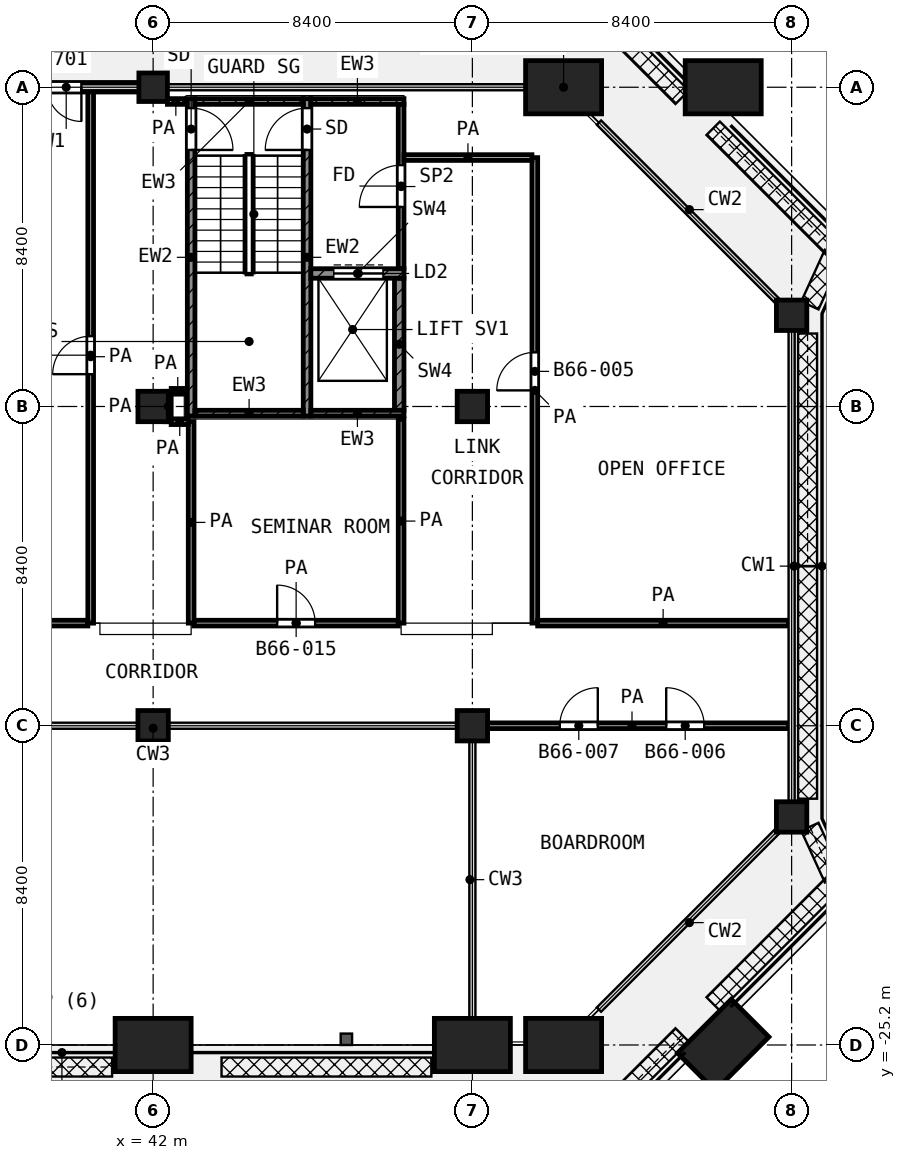
"""IFC4 building model, lengths in metres.
Left out: names, types, materials, properties, quantities, classifications, styles, units other than length and angle.
Written with IfcOpenShell. Run it as: python <this file> out.ifc"""

import sys

from ifc_helpers import new_model, si_unit, direction, frame, frame_2d, origin, origin_2d, place, context, subcontext, project, spatial, rectangle, extrude, element, fill, save


model = new_model("IFC4")
c1 = context("Model", 3, precision=1e-05, world=origin(), true_north=direction((0.0, 1.0)))
c2 = subcontext(c1, "Body", "Model", "MODEL_VIEW")
j1 = project(units=[si_unit("LENGTHUNIT", "METRE"), si_unit("PLANEANGLEUNIT", "RADIAN")], contexts=[c1])
p1 = place(None, origin())
s1 = spatial("IfcSite", under=j1, at=p1, CompositionType="ELEMENT")
p2 = place(p1, origin())
s2 = spatial("IfcBuilding", under=s1, at=p2, CompositionType="ELEMENT")
p3 = place(p2, frame((0.0, 0.0, 286.0)))
s3 = spatial("IfcBuildingStorey", under=s2, at=p3, CompositionType="ELEMENT", Elevation=286.0)
p4 = place(p3, frame((42.0, 0.0, 0.0), z_axis=(0.0, 0.0, 1.0), x_axis=(1.0, 0.0, 0.0)))
e1 = element("IfcColumn", 1, at=p4, inside=s3, PredefinedType="COLUMN", context=c2, shape_type="SweptSolid", body=[
    extrude(rectangle(XDim=0.75, YDim=0.75, at=origin_2d()), origin(), (0.0, 0.0, 1.0), 4.2),
])
p5 = place(p3, frame((52.8, 0.0, 0.0), z_axis=(0.0, 0.0, 1.0), x_axis=(1.0, 0.0, 0.0)))
e2 = element("IfcColumn", 2, at=p5, inside=s3, PredefinedType="COLUMN", context=c2, shape_type="SweptSolid", body=[
    extrude(rectangle(XDim=2.0, YDim=1.4, at=origin_2d()), origin(), (0.0, 0.0, 1.0), 4.2),
])
for number, where, z_axis, x_axis in (
    (3, (58.8, -6.0, 0.0), (0.0, 0.0, 1.0), (1.0, 0.0, 0.0)),
    (4, (42.0, -8.4, 0.0), (0.0, 0.0, 1.0), (1.0, 0.0, 0.0)),
    (5, (50.4, -8.4, 0.0), (0.0, 0.0, 1.0), (1.0, 0.0, 0.0)),
    (6, (42.0, -16.8, 0.0), (0.0, 0.0, 1.0), (1.0, 0.0, 0.0)),
    (7, (50.4, -16.8, 0.0), (0.0, 0.0, 1.0), (1.0, 0.0, 0.0)),
    (8, (58.8, -19.2, 0.0), (0.0, 0.0, 1.0), (1.0, 0.0, 0.0)),
):
    element("IfcColumn", number, at=place(p3, frame(where, z_axis=z_axis, x_axis=x_axis)), inside=s3, PredefinedType="COLUMN", context=c2, shape_type="SweptSolid", body=[
        extrude(rectangle(XDim=0.8, YDim=0.8, at=origin_2d()), origin(), (0.0, 0.0, 1.0), 4.2),
    ])
for number, where, z_axis, x_axis in (
    (9, (42.0, -25.2, 0.0), (0.0, 0.0, 1.0), (-1.0, 0.0, 0.0)),
    (10, (52.8, -25.2, 0.0), (0.0, 0.0, 1.0), (-1.0, 0.0, 0.0)),
    (11, (50.4, -25.2, 0.0), (0.0, 0.0, 1.0), (-1.0, 0.0, 0.0)),
    (12, (57.0, 0.0, 0.0), (0.0, 0.0, 1.0), (1.0, 0.0, 0.0)),
    (13, (57.0, -25.2, 0.0), (0.0, 0.0, 1.0), (-0.707, -0.707, 0.0)),
):
    element("IfcColumn", number, at=place(p3, frame(where, z_axis=z_axis, x_axis=x_axis)), inside=s3, PredefinedType="COLUMN", context=c2, shape_type="SweptSolid", body=[
        extrude(rectangle(XDim=2.0, YDim=1.4, at=origin_2d()), origin(), (0.0, 0.0, 1.0), 4.2),
    ])
p6 = place(p3, frame((41.625, 0.0, 0.0), z_axis=(0.0, 0.0, 1.0), x_axis=(-1.0, 0.0, 0.0)))
e14 = element("IfcWall", 14, at=p6, inside=s3, PredefinedType="SOLIDWALL", context=c2, shape_type="SweptSolid", body=[
    extrude(rectangle(XDim=3.825, YDim=0.25, at=frame_2d((1.913, 0.0))), origin(), (0.0, 0.0, 1.0), 3.48),
])
p7 = place(p6, frame((1.512, 0.0, 0.0)))
e15 = element("IfcOpeningElement", 15, at=p7, cuts=e14, PredefinedType="OPENING", context=c2, shape_type="SweptSolid", body=[
    extrude(rectangle(XDim=1.8, YDim=2.1, at=frame_2d((0.9, 1.05))), frame((0.0, 0.135, 0.0), z_axis=(0.0, -1.0, 0.0), x_axis=(1.0, 0.0, 0.0)), (0.0, 0.0, 1.0), 0.27),
])
p8 = place(p3, frame((43.0, -8.65, 0.0), z_axis=(0.0, 0.0, 1.0), x_axis=(0.0, 1.0, 0.0)))
e16 = element("IfcWall", 16, at=p8, inside=s3, PredefinedType="SHEAR", context=c2, shape_type="SweptSolid", body=[
    extrude(rectangle(XDim=8.35, YDim=0.2, at=frame_2d((4.175, 0.0))), origin(), (0.0, 0.0, 1.0), 3.6),
])
p9 = place(p8, frame((7.0, 0.0, 0.0)))
e17 = element("IfcOpeningElement", 17, at=p9, cuts=e16, PredefinedType="OPENING", context=c2, shape_type="SweptSolid", body=[
    extrude(rectangle(XDim=1.1, YDim=2.1, at=frame_2d((0.55, 1.05))), frame((0.0, 0.11, 0.0), z_axis=(0.0, -1.0, 0.0), x_axis=(1.0, 0.0, 0.0)), (0.0, 0.0, 1.0), 0.22),
])
p10 = place(p3, frame((46.05, -8.65, 0.0), z_axis=(0.0, 0.0, 1.0), x_axis=(0.0, 1.0, 0.0)))
e18 = element("IfcWall", 18, at=p10, inside=s3, PredefinedType="SHEAR", context=c2, shape_type="SweptSolid", body=[
    extrude(rectangle(XDim=8.35, YDim=0.2, at=frame_2d((4.175, 0.0))), origin(), (0.0, 0.0, 1.0), 3.6),
])
p11 = place(p10, frame((7.0, 0.0, 0.0)))
e19 = element("IfcOpeningElement", 19, at=p11, cuts=e18, PredefinedType="OPENING", context=c2, shape_type="SweptSolid", body=[
    extrude(rectangle(XDim=1.1, YDim=2.1, at=frame_2d((0.55, 1.05))), frame((0.0, 0.11, 0.0), z_axis=(0.0, -1.0, 0.0), x_axis=(1.0, 0.0, 0.0)), (0.0, 0.0, 1.0), 0.22),
])
p12 = place(p3, frame((43.1, -0.375, 0.0), z_axis=(0.0, 0.0, 1.0), x_axis=(1.0, 0.0, 0.0)))
e20 = element("IfcWall", 20, at=p12, inside=s3, PredefinedType="SHEAR", context=c2, shape_type="SweptSolid", body=[
    extrude(rectangle(XDim=2.85, YDim=0.15, at=frame_2d((1.425, 0.0))), origin(), (0.0, 0.0, 1.0), 3.6),
])
p13 = place(p3, frame((46.15, -0.375, 0.0), z_axis=(0.0, 0.0, 1.0), x_axis=(1.0, 0.0, 0.0)))
e21 = element("IfcWall", 21, at=p13, inside=s3, PredefinedType="SHEAR", context=c2, shape_type="SweptSolid", body=[
    extrude(rectangle(XDim=2.45, YDim=0.15, at=frame_2d((1.225, 0.0))), origin(), (0.0, 0.0, 1.0), 3.6),
])
p14 = place(p3, frame((43.1, -8.575, 0.0), z_axis=(0.0, 0.0, 1.0), x_axis=(1.0, 0.0, 0.0)))
e22 = element("IfcWall", 22, at=p14, inside=s3, PredefinedType="SHEAR", context=c2, shape_type="SweptSolid", body=[
    extrude(rectangle(XDim=2.85, YDim=0.15, at=frame_2d((1.425, 0.0))), origin(), (0.0, 0.0, 1.0), 3.6),
])
p15 = place(p3, frame((46.15, -8.575, 0.0), z_axis=(0.0, 0.0, 1.0), x_axis=(1.0, 0.0, 0.0)))
e23 = element("IfcWall", 23, at=p15, inside=s3, PredefinedType="SHEAR", context=c2, shape_type="SweptSolid", body=[
    extrude(rectangle(XDim=2.45, YDim=0.15, at=frame_2d((1.225, 0.0))), origin(), (0.0, 0.0, 1.0), 3.6),
])
p16 = place(p3, frame((46.15, -4.9, 0.0), z_axis=(0.0, 0.0, 1.0), x_axis=(1.0, 0.0, 0.0)))
e24 = element("IfcWall", 24, at=p16, inside=s3, PredefinedType="SHEAR", context=c2, shape_type="SweptSolid", body=[
    extrude(rectangle(XDim=2.45, YDim=0.25, at=frame_2d((1.225, 0.0))), origin(), (0.0, 0.0, 1.0), 3.6),
])
p17 = place(p16, frame((0.6, 0.0, 0.0)))
e25 = element("IfcOpeningElement", 25, at=p17, cuts=e24, PredefinedType="OPENING", context=c2, shape_type="SweptSolid", body=[
    extrude(rectangle(XDim=1.3, YDim=2.1, at=frame_2d((0.65, 1.05))), frame((0.0, 0.135, 0.0), z_axis=(0.0, -1.0, 0.0), x_axis=(1.0, 0.0, 0.0)), (0.0, 0.0, 1.0), 0.27),
])
p18 = place(p3, frame((48.475, -8.5, 0.0), z_axis=(0.0, 0.0, 1.0), x_axis=(0.0, 1.0, 0.0)))
e26 = element("IfcWall", 26, at=p18, inside=s3, PredefinedType="SHEAR", context=c2, shape_type="SweptSolid", body=[
    extrude(rectangle(XDim=3.475, YDim=0.25, at=frame_2d((1.738, 0.0))), origin(), (0.0, 0.0, 1.0), 3.6),
])
p19 = place(p3, frame((48.525, -4.775, 0.0), z_axis=(0.0, 0.0, 1.0), x_axis=(0.0, 1.0, 0.0)))
e27 = element("IfcWall", 27, at=p19, inside=s3, PredefinedType="PARTITIONING", context=c2, shape_type="SweptSolid", body=[
    extrude(rectangle(XDim=4.325, YDim=0.15, at=frame_2d((2.163, 0.0))), origin(), (0.0, 0.0, 1.0), 3.6),
])
p20 = place(p19, frame((1.625, 0.0, 0.0)))
e28 = element("IfcOpeningElement", 28, at=p20, cuts=e27, PredefinedType="OPENING", context=c2, shape_type="SweptSolid", body=[
    extrude(rectangle(XDim=1.1, YDim=2.1, at=frame_2d((0.55, 1.05))), frame((0.0, 0.085, 0.0), z_axis=(0.0, -1.0, 0.0), x_axis=(1.0, 0.0, 0.0)), (0.0, 0.0, 1.0), 0.17),
])
p21 = place(p3, frame((50.48, -16.8, 0.0), z_axis=(0.0, 0.0, 1.0), x_axis=(1.0, 0.0, 0.0)))
e29 = element("IfcWall", 29, at=p21, inside=s3, PredefinedType="PARTITIONING", context=c2, shape_type="SweptSolid", body=[
    extrude(rectangle(XDim=8.24, YDim=0.15, at=frame_2d((4.12, 0.0))), origin(), (0.0, 0.0, 1.0), 3.6),
])
p22 = place(p21, frame((5.02, 0.0, 0.0)))
e30 = element("IfcOpeningElement", 30, at=p22, cuts=e29, PredefinedType="OPENING", context=c2, shape_type="SweptSolid", body=[
    extrude(rectangle(XDim=1.0, YDim=2.1, at=frame_2d((0.5, 1.05))), frame((0.0, 0.085, 0.0), z_axis=(0.0, -1.0, 0.0), x_axis=(1.0, 0.0, 0.0)), (0.0, 0.0, 1.0), 0.17),
])
p23 = place(p21, frame((2.22, 0.0, 0.0)))
e31 = element("IfcOpeningElement", 31, at=p23, cuts=e29, PredefinedType="OPENING", context=c2, shape_type="SweptSolid", body=[
    extrude(rectangle(XDim=1.0, YDim=2.1, at=frame_2d((0.5, 1.05))), frame((0.0, 0.085, 0.0), z_axis=(0.0, -1.0, 0.0), x_axis=(1.0, 0.0, 0.0)), (0.0, 0.0, 1.0), 0.17),
])
p24 = place(p3, frame((29.475, -14.1, 0.0), z_axis=(0.0, 0.0, 1.0), x_axis=(1.0, 0.0, 0.0)))
e32 = element("IfcWall", 32, at=p24, inside=s3, PredefinedType="PARTITIONING", context=c2, shape_type="SweptSolid", body=[
    extrude(rectangle(XDim=10.807, YDim=0.15, at=frame_2d((5.403, 0.0))), origin(), (0.0, 0.0, 1.0), 3.6),
])
p25 = place(p3, frame((43.075, -14.1, 0.0), z_axis=(0.0, 0.0, 1.0), x_axis=(1.0, 0.0, 0.0)))
e33 = element("IfcWall", 33, at=p25, inside=s3, PredefinedType="PARTITIONING", context=c2, shape_type="SweptSolid", body=[
    extrude(rectangle(XDim=5.375, YDim=0.15, at=frame_2d((2.688, 0.0))), origin(), (0.0, 0.0, 1.0), 3.6),
])
p26 = place(p25, frame((2.188, 0.0, 0.0)))
e34 = element("IfcOpeningElement", 34, at=p26, cuts=e33, PredefinedType="OPENING", context=c2, shape_type="SweptSolid", body=[
    extrude(rectangle(XDim=1.0, YDim=2.1, at=frame_2d((0.5, 1.05))), frame((0.0, 0.085, 0.0), z_axis=(0.0, -1.0, 0.0), x_axis=(1.0, 0.0, 0.0)), (0.0, 0.0, 1.0), 0.17),
])
p27 = place(p3, frame((52.118, -14.1, 0.0), z_axis=(0.0, 0.0, 1.0), x_axis=(1.0, 0.0, 0.0)))
e35 = element("IfcWall", 35, at=p27, inside=s3, PredefinedType="PARTITIONING", context=c2, shape_type="SweptSolid", body=[
    extrude(rectangle(XDim=6.602, YDim=0.15, at=frame_2d((3.301, 0.0))), origin(), (0.0, 0.0, 1.0), 3.6),
])
p28 = place(p3, frame((42.475, -8.8, 0.0), z_axis=(0.0, 0.0, 1.0), x_axis=(1.0, 0.0, 0.0)))
e36 = element("IfcWall", 36, at=p28, inside=s3, PredefinedType="PARTITIONING", context=c2, shape_type="SweptSolid", body=[
    extrude(rectangle(XDim=0.45, YDim=0.15, at=frame_2d((0.225, 0.0))), origin(), (0.0, 0.0, 1.0), 3.6),
])
p29 = place(p3, frame((42.476, -8.0, 0.0), z_axis=(0.0, 0.0, 1.0), x_axis=(1.0, 0.0, 0.0)))
e37 = element("IfcWall", 37, at=p29, inside=s3, PredefinedType="PARTITIONING", context=c2, shape_type="SweptSolid", body=[
    extrude(rectangle(XDim=0.344, YDim=0.15, at=frame_2d((0.172, 0.0))), origin(), (0.0, 0.0, 1.0), 3.6),
])
p30 = place(p3, frame((48.6, -1.85, 0.0), z_axis=(0.0, 0.0, 1.0), x_axis=(1.0, 0.0, 0.0)))
e38 = element("IfcWall", 38, at=p30, inside=s3, PredefinedType="PARTITIONING", context=c2, shape_type="SweptSolid", body=[
    extrude(rectangle(XDim=3.367, YDim=0.15, at=frame_2d((1.684, 0.0))), origin(), (0.0, 0.0, 1.0), 3.6),
])
p31 = place(p3, frame((42.375, -0.375, 0.0), z_axis=(0.0, 0.0, 1.0), x_axis=(1.0, 0.0, 0.0)))
e39 = element("IfcWall", 39, at=p31, inside=s3, PredefinedType="PARTITIONING", context=c2, shape_type="SweptSolid", body=[
    extrude(rectangle(XDim=0.445, YDim=0.15, at=frame_2d((0.223, 0.0))), origin(), (0.0, 0.0, 1.0), 3.6),
])
p32 = place(p3, frame((40.357, -14.1, 0.0), z_axis=(0.0, 0.0, 1.0), x_axis=(0.0, 1.0, 0.0)))
e40 = element("IfcWall", 40, at=p32, inside=s3, PredefinedType="PARTITIONING", context=c2, shape_type="SweptSolid", body=[
    extrude(rectangle(XDim=14.02, YDim=0.15, at=frame_2d((7.01, 0.0))), origin(), (0.0, 0.0, 1.0), 3.6),
])
p33 = place(p32, frame((6.55, 0.0, 0.0)))
e41 = element("IfcOpeningElement", 41, at=p33, cuts=e40, PredefinedType="OPENING", context=c2, shape_type="SweptSolid", body=[
    extrude(rectangle(XDim=1.0, YDim=2.1, at=frame_2d((0.5, 1.05))), frame((0.0, 0.085, 0.0), z_axis=(0.0, -1.0, 0.0), x_axis=(1.0, 0.0, 0.0)), (0.0, 0.0, 1.0), 0.17),
])
p34 = place(p3, frame((42.4, -8.8, 0.0), z_axis=(0.0, 0.0, 1.0), x_axis=(0.0, 1.0, 0.0)))
e42 = element("IfcWall", 42, at=p34, inside=s3, PredefinedType="PARTITIONING", context=c2, shape_type="SweptSolid", body=[
    extrude(rectangle(XDim=0.799, YDim=0.15, at=frame_2d((0.399, 0.0))), origin(), (0.0, 0.0, 1.0), 3.6),
])
p35 = place(p3, frame((43.0, -14.1, 0.0), z_axis=(0.0, 0.0, 1.0), x_axis=(0.0, 1.0, 0.0)))
e43 = element("IfcWall", 43, at=p35, inside=s3, PredefinedType="PARTITIONING", context=c2, shape_type="SweptSolid", body=[
    extrude(rectangle(XDim=5.3, YDim=0.15, at=frame_2d((2.65, 0.0))), origin(), (0.0, 0.0, 1.0), 3.6),
])
p36 = place(p3, frame((48.525, -14.1, 0.0), z_axis=(0.0, 0.0, 1.0), x_axis=(0.0, 1.0, 0.0)))
e44 = element("IfcWall", 44, at=p36, inside=s3, PredefinedType="PARTITIONING", context=c2, shape_type="SweptSolid", body=[
    extrude(rectangle(XDim=5.37, YDim=0.15, at=frame_2d((2.685, 0.0))), origin(), (0.0, 0.0, 1.0), 3.6),
])
p37 = place(p3, frame((52.043, -14.1, 0.0), z_axis=(0.0, 0.0, 1.0), x_axis=(0.0, 1.0, 0.0)))
e45 = element("IfcWall", 45, at=p37, inside=s3, PredefinedType="PARTITIONING", context=c2, shape_type="SweptSolid", body=[
    extrude(rectangle(XDim=12.248, YDim=0.15, at=frame_2d((6.124, 0.0))), origin(), (0.0, 0.0, 1.0), 3.6),
])
p38 = place(p37, frame((6.124, 0.0, 0.0)))
e46 = element("IfcOpeningElement", 46, at=p38, cuts=e45, PredefinedType="OPENING", context=c2, shape_type="SweptSolid", body=[
    extrude(rectangle(XDim=1.0, YDim=2.1, at=frame_2d((0.5, 1.05))), frame((0.0, 0.085, 0.0), z_axis=(0.0, -1.0, 0.0), x_axis=(1.0, 0.0, 0.0)), (0.0, 0.0, 1.0), 0.17),
])
p39 = place(p7, origin())
e47 = element("IfcDoor", 47, at=p39, inside=s3, OperationType="DOUBLE_DOOR_SINGLE_SWING", PredefinedType="DOOR", context=c2, shape_type="SweptSolid", body=[
    extrude(rectangle(XDim=1.8, YDim=2.1, at=frame_2d((0.9, 1.05))), frame((0.0, 0.025, 0.0), z_axis=(0.0, -1.0, 0.0), x_axis=(1.0, 0.0, 0.0)), (0.0, 0.0, 1.0), 0.05),
])
fill(e15, e47)
p40 = place(p9, frame((1.1, 0.0, 0.0), z_axis=(0.0, 0.0, 1.0), x_axis=(-1.0, 0.0, 0.0)))
e48 = element("IfcDoor", 48, at=p40, inside=s3, OperationType="SINGLE_SWING_LEFT", PredefinedType="DOOR", context=c2, shape_type="SweptSolid", body=[
    extrude(rectangle(XDim=1.1, YDim=2.1, at=frame_2d((0.55, 1.05))), frame((0.0, 0.025, 0.0), z_axis=(0.0, -1.0, 0.0), x_axis=(1.0, 0.0, 0.0)), (0.0, 0.0, 1.0), 0.05),
])
fill(e17, e48)
p41 = place(p11, origin())
e49 = element("IfcDoor", 49, at=p41, inside=s3, OperationType="SINGLE_SWING_LEFT", PredefinedType="DOOR", context=c2, shape_type="SweptSolid", body=[
    extrude(rectangle(XDim=1.1, YDim=2.1, at=frame_2d((0.55, 1.05))), frame((0.0, 0.025, 0.0), z_axis=(0.0, -1.0, 0.0), x_axis=(1.0, 0.0, 0.0)), (0.0, 0.0, 1.0), 0.05),
])
fill(e19, e49)
p42 = place(p17, origin())
e50 = element("IfcDoor", 50, at=p42, inside=s3, OperationType="DOUBLE_DOOR_SLIDING", PredefinedType="DOOR", context=c2, shape_type="SweptSolid", body=[
    extrude(rectangle(XDim=1.3, YDim=2.1, at=frame_2d((0.65, 1.05))), frame((0.0, 0.025, 0.0), z_axis=(0.0, -1.0, 0.0), x_axis=(1.0, 0.0, 0.0)), (0.0, 0.0, 1.0), 0.05),
])
fill(e25, e50)
p43 = place(p20, origin())
e51 = element("IfcDoor", 51, at=p43, inside=s3, OperationType="SINGLE_SWING_LEFT", PredefinedType="DOOR", context=c2, shape_type="SweptSolid", body=[
    extrude(rectangle(XDim=1.1, YDim=2.1, at=frame_2d((0.55, 1.05))), frame((0.0, 0.025, 0.0), z_axis=(0.0, -1.0, 0.0), x_axis=(1.0, 0.0, 0.0)), (0.0, 0.0, 1.0), 0.05),
])
fill(e28, e51)
p44 = place(p38, origin())
e52 = element("IfcDoor", 52, at=p44, inside=s3, OperationType="SINGLE_SWING_LEFT", PredefinedType="DOOR", context=c2, shape_type="SweptSolid", body=[
    extrude(rectangle(XDim=1.0, YDim=2.1, at=frame_2d((0.5, 1.05))), frame((0.0, 0.025, 0.0), z_axis=(0.0, -1.0, 0.0), x_axis=(1.0, 0.0, 0.0)), (0.0, 0.0, 1.0), 0.05),
])
fill(e46, e52)
p45 = place(p22, origin())
e53 = element("IfcDoor", 53, at=p45, inside=s3, OperationType="SINGLE_SWING_LEFT", PredefinedType="DOOR", context=c2, shape_type="SweptSolid", body=[
    extrude(rectangle(XDim=1.0, YDim=2.1, at=frame_2d((0.5, 1.05))), frame((0.0, 0.025, 0.0), z_axis=(0.0, -1.0, 0.0), x_axis=(1.0, 0.0, 0.0)), (0.0, 0.0, 1.0), 0.05),
])
fill(e30, e53)
p46 = place(p23, origin())
e54 = element("IfcDoor", 54, at=p46, inside=s3, OperationType="SINGLE_SWING_RIGHT", PredefinedType="DOOR", context=c2, shape_type="SweptSolid", body=[
    extrude(rectangle(XDim=1.0, YDim=2.1, at=frame_2d((0.5, 1.05))), frame((0.0, 0.025, 0.0), z_axis=(0.0, -1.0, 0.0), x_axis=(1.0, 0.0, 0.0)), (0.0, 0.0, 1.0), 0.05),
])
fill(e31, e54)
p47 = place(p33, origin())
e55 = element("IfcDoor", 55, at=p47, inside=s3, OperationType="SINGLE_SWING_LEFT", PredefinedType="DOOR", context=c2, shape_type="SweptSolid", body=[
    extrude(rectangle(XDim=1.0, YDim=2.1, at=frame_2d((0.5, 1.05))), frame((0.0, 0.025, 0.0), z_axis=(0.0, -1.0, 0.0), x_axis=(1.0, 0.0, 0.0)), (0.0, 0.0, 1.0), 0.05),
])
fill(e41, e55)
p48 = place(p26, origin())
e56 = element("IfcDoor", 56, at=p48, inside=s3, OperationType="SINGLE_SWING_LEFT", PredefinedType="DOOR", context=c2, shape_type="SweptSolid", body=[
    extrude(rectangle(XDim=1.0, YDim=2.1, at=frame_2d((0.5, 1.05))), frame((0.0, 0.025, 0.0), z_axis=(0.0, -1.0, 0.0), x_axis=(1.0, 0.0, 0.0)), (0.0, 0.0, 1.0), 0.05),
])
fill(e34, e56)
save(model, sys.argv[1])
